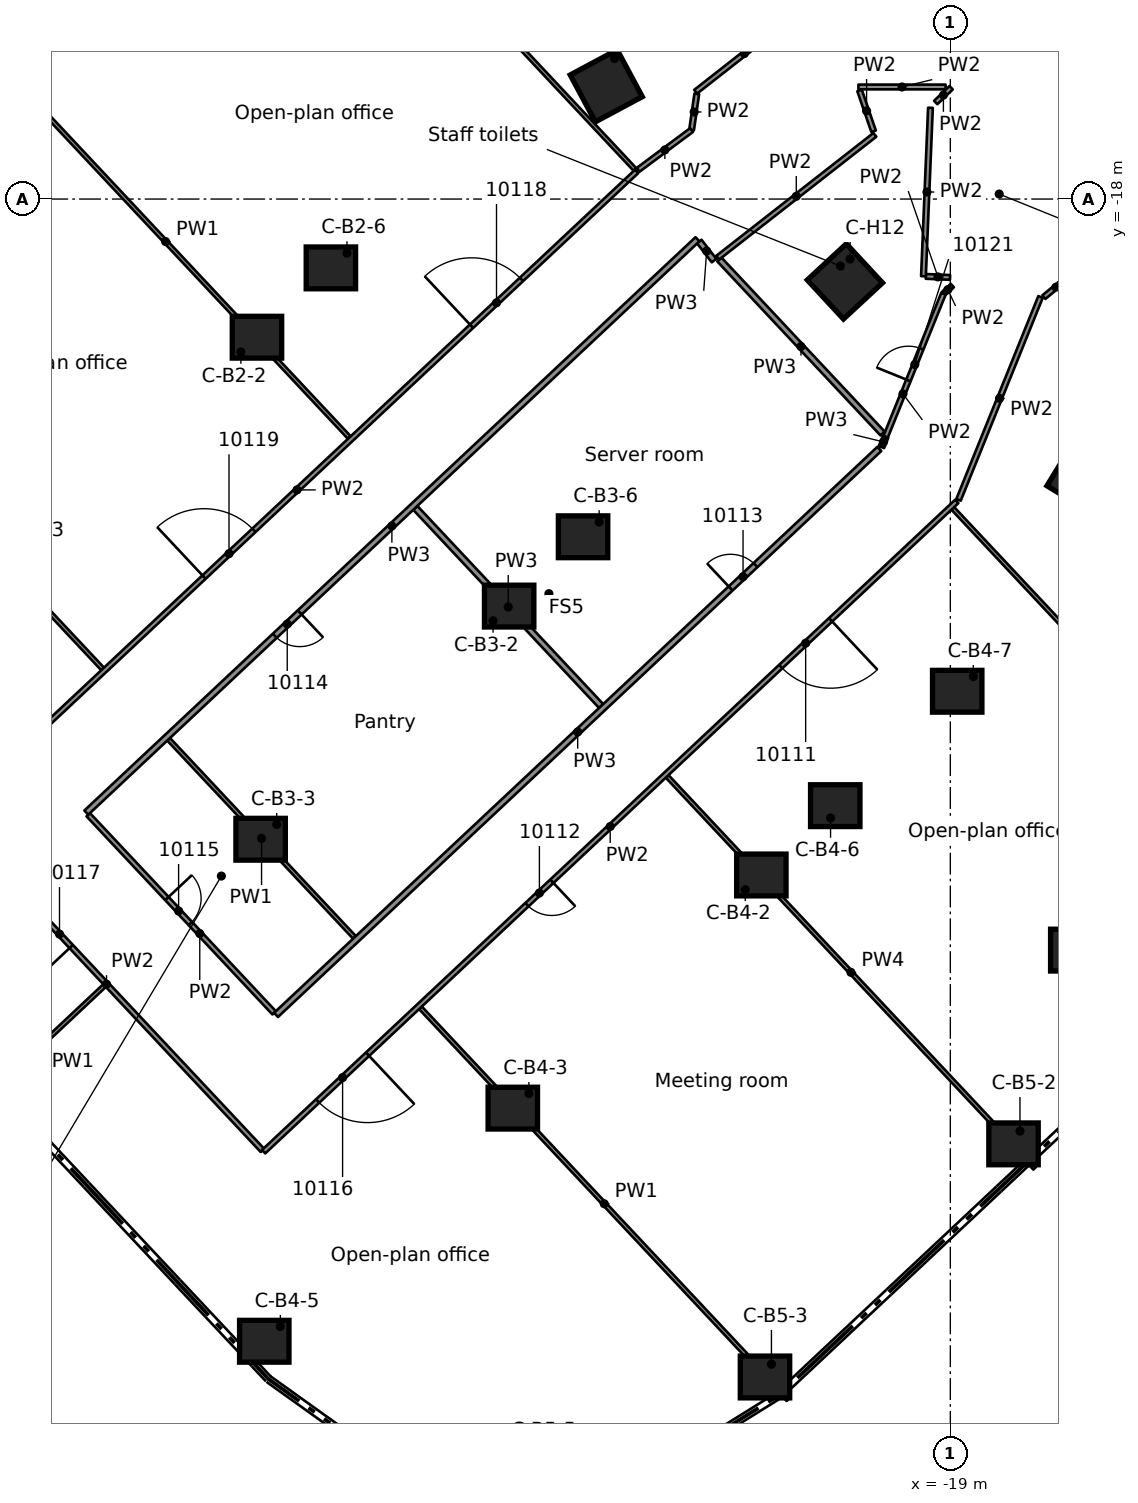
"""IFC4 building model, lengths in metres.
Left out: names, types, materials, properties, quantities, classifications, styles, units other than length and angle.
Written with IfcOpenShell. Run it as: python <this file> out.ifc"""

import sys

from ifc_helpers import new_model, si_unit, direction, frame, frame_2d, origin, origin_2d, place, context, subcontext, project, spatial, rectangle, extrude, element, fill, save


model = new_model("IFC4")
c1 = context("Model", 3, precision=1e-05, world=origin(), true_north=direction((0.0, 1.0)))
c2 = subcontext(c1, "Body", "Model", "MODEL_VIEW")
j1 = project(units=[si_unit("LENGTHUNIT", "METRE"), si_unit("PLANEANGLEUNIT", "RADIAN")], contexts=[c1])
p1 = place(None, origin())
s1 = spatial("IfcSite", under=j1, at=p1, CompositionType="ELEMENT")
p2 = place(p1, origin())
s2 = spatial("IfcBuilding", under=s1, at=p2, CompositionType="ELEMENT")
p3 = place(p2, frame((0.0, 0.0, 51.3)))
s3 = spatial("IfcBuildingStorey", under=s2, at=p3, CompositionType="ELEMENT", Elevation=51.3)
for number, where, z_axis, x_axis in (
    (1, (-37.245, -21.635, 0.0), (0.0, 0.0, 1.0), (1.0, 0.0, 0.0)),
    (2, (-35.3, -19.811, 0.0), (0.0, 0.0, 1.0), (1.0, 0.0, 0.0)),
    (3, (-30.609, -28.71, 0.0), (0.0, 0.0, 1.0), (1.0, 0.0, 0.0)),
    (4, (-37.149, -34.845, 0.0), (0.0, 0.0, 1.0), (1.0, 0.0, 0.0)),
    (5, (-28.664, -26.886, 0.0), (0.0, 0.0, 1.0), (1.0, 0.0, 0.0)),
    (6, (-23.973, -35.785, 0.0), (0.0, 0.0, 1.0), (1.0, 0.0, 0.0)),
    (7, (-30.513, -41.92, 0.0), (0.0, 0.0, 1.0), (1.0, 0.0, 0.0)),
    (8, (-37.053, -48.054, 0.0), (0.0, 0.0, 1.0), (1.0, 0.0, 0.0)),
    (9, (-22.028, -33.961, 0.0), (0.0, 0.0, 1.0), (1.0, 0.0, 0.0)),
    (10, (-18.819, -30.951, 0.0), (0.0, 0.0, 1.0), (1.0, 0.0, 0.0)),
    (11, (-17.337, -42.86, 0.0), (0.0, 0.0, 1.0), (1.0, 0.0, 0.0)),
    (12, (-23.877, -48.994, 0.0), (0.0, 0.0, 1.0), (1.0, 0.0, 0.0)),
    (13, (-15.712, -37.762, 0.0), (0.0, 0.0, 1.0), (1.0, 0.0, 0.0)),
):
    element("IfcColumn", number, at=place(p3, frame(where, z_axis=z_axis, x_axis=x_axis)), inside=s3, PredefinedType="COLUMN", context=c2, shape_type="SweptSolid", body=[
        extrude(rectangle(XDim=1.3, YDim=1.1, at=origin_2d()), origin(), (0.0, 0.0, 1.0), 3.5),
    ])
for number, where, z_axis, x_axis in (
    (14, (-15.495, -25.313, 0.0), (0.0, 0.0, 1.0), (-0.522, -0.853, 0.0)),
    (15, (-21.774, -20.167, 0.0), (0.0, 0.0, 1.0), (-0.734, -0.68, 0.0)),
    (16, (-28.054, -15.021, 0.0), (0.0, 0.0, 1.0), (-0.882, -0.472, 0.0)),
):
    element("IfcColumn", number, at=place(p3, frame(where, z_axis=z_axis, x_axis=x_axis)), inside=s3, PredefinedType="COLUMN", context=c2, shape_type="SweptSolid", body=[
        extrude(rectangle(XDim=1.4, YDim=1.4, at=origin_2d()), origin(), (0.0, 0.0, 1.0), 3.5),
    ])
p4 = place(p3, frame((-21.388, -15.143, 0.0), z_axis=(0.0, 0.0, 1.0), x_axis=(0.324857441557, -0.945762994976, 0.0)))
e17 = element("IfcWall", 17, at=p4, inside=s3, PredefinedType="PARTITIONING", context=c2, shape_type="SweptSolid", body=[
    extrude(rectangle(XDim=1.135, YDim=0.125, at=frame_2d((0.568, 0.0))), origin(), (0.0, 0.0, 1.0), 3.08),
])
p5 = place(p3, frame((-25.672, -15.233, 0.0), z_axis=(0.0, 0.0, 1.0), x_axis=(-0.142523859518, -0.989791366636, 0.0)))
e18 = element("IfcWall", 18, at=p5, inside=s3, PredefinedType="PARTITIONING", context=c2, shape_type="SweptSolid", body=[
    extrude(rectangle(XDim=0.961, YDim=0.125, at=frame_2d((0.48, 0.0))), origin(), (0.0, 0.0, 1.0), 3.08),
])
p6 = place(p3, frame((-25.607, -19.117, 0.0), z_axis=(0.0, 0.0, 1.0), x_axis=(0.613435225839, -0.789745037148, 0.0)))
e19 = element("IfcWall", 19, at=p6, inside=s3, PredefinedType="PARTITIONING", context=c2, shape_type="SweptSolid", body=[
    extrude(rectangle(XDim=0.635, YDim=0.15, at=frame_2d((0.318, 0.0))), origin(), (0.0, 0.0, 1.0), 3.08),
])
p7 = place(p3, frame((-37.101, -43.032, 0.0), z_axis=(0.0, 0.0, 1.0), x_axis=(-0.684230259848, 0.729266036168, 0.0)))
e20 = element("IfcWall", 20, at=p7, inside=s3, PredefinedType="PARTITIONING", context=c2, shape_type="SweptSolid", body=[
    extrude(rectangle(XDim=11.991, YDim=0.125, at=frame_2d((5.996, 0.0))), origin(), (0.0, 0.0, 1.0), 3.08),
])
p8 = place(p7, frame((7.355, 0.0, 0.0)))
e21 = element("IfcOpeningElement", 21, at=p8, cuts=e20, PredefinedType="OPENING", context=c2, shape_type="SweptSolid", body=[
    extrude(rectangle(XDim=0.9, YDim=2.1, at=frame_2d((0.45, 1.05))), frame((0.0, 0.073, 0.0), z_axis=(0.0, -1.0, 0.0), x_axis=(1.0, 0.0, 0.0)), (0.0, 0.0, 1.0), 0.145),
])
p9 = place(p3, frame((-41.685, -34.199, 0.0), z_axis=(0.0, 0.0, 1.0), x_axis=(0.68422395917, -0.729271947697, 0.0)))
e22 = element("IfcWall", 22, at=p9, inside=s3, PredefinedType="PARTITIONING", context=c2, shape_type="SweptSolid", body=[
    extrude(rectangle(XDim=7.148, YDim=0.125, at=frame_2d((3.574, 0.0))), origin(), (0.0, 0.0, 1.0), 3.08),
])
p10 = place(p9, frame((3.025, 0.0, 0.0)))
e23 = element("IfcOpeningElement", 23, at=p10, cuts=e22, PredefinedType="OPENING", context=c2, shape_type="SweptSolid", body=[
    extrude(rectangle(XDim=0.9, YDim=2.1, at=frame_2d((0.45, 1.05))), frame((0.0, 0.073, 0.0), z_axis=(0.0, -1.0, 0.0), x_axis=(1.0, 0.0, 0.0)), (0.0, 0.0, 1.0), 0.145),
])
p11 = place(p3, frame((-50.979, -20.052, 0.0), z_axis=(0.0, 0.0, 1.0), x_axis=(0.684149048077, -0.729342224209, 0.0)))
e24 = element("IfcWall", 24, at=p11, inside=s3, PredefinedType="PARTITIONING", context=c2, shape_type="SweptSolid", body=[
    extrude(rectangle(XDim=14.137, YDim=0.1, at=frame_2d((7.069, 0.0))), origin(), (0.0, 0.0, 1.0), 3.08),
])
p12 = place(p3, frame((-39.57, -32.215, 0.0), z_axis=(0.0, 0.0, 1.0), x_axis=(0.684241001323, -0.729255957884, 0.0)))
e25 = element("IfcWall", 25, at=p12, inside=s3, PredefinedType="PARTITIONING", context=c2, shape_type="SweptSolid", body=[
    extrude(rectangle(XDim=7.148, YDim=0.1, at=frame_2d((3.574, 0.0))), origin(), (0.0, 0.0, 1.0), 3.08),
])
p13 = place(p3, frame((-32.943, -39.281, 0.0), z_axis=(0.0, 0.0, 1.0), x_axis=(0.684149048077, -0.729342224209, 0.0)))
e26 = element("IfcWall", 26, at=p13, inside=s3, PredefinedType="PARTITIONING", context=c2, shape_type="SweptSolid", body=[
    extrude(rectangle(XDim=14.137, YDim=0.1, at=frame_2d((7.069, 0.0))), origin(), (0.0, 0.0, 1.0), 3.08),
])
p14 = place(p3, frame((-44.487, -13.963, 0.0), z_axis=(0.0, 0.0, 1.0), x_axis=(0.684112301014, -0.729376692526, 0.0)))
e27 = element("IfcWall", 27, at=p14, inside=s3, PredefinedType="PARTITIONING", context=c2, shape_type="SweptSolid", body=[
    extrude(rectangle(XDim=14.137, YDim=0.1, at=frame_2d((7.068, 0.0))), origin(), (0.0, 0.0, 1.0), 3.08),
])
p15 = place(p3, frame((-33.079, -26.126, 0.0), z_axis=(0.0, 0.0, 1.0), x_axis=(0.684155795313, -0.729335895003, 0.0)))
e28 = element("IfcWall", 28, at=p15, inside=s3, PredefinedType="PARTITIONING", context=c2, shape_type="SweptSolid", body=[
    extrude(rectangle(XDim=7.149, YDim=0.15, at=frame_2d((3.575, 0.0))), origin(), (0.0, 0.0, 1.0), 3.08),
])
p16 = place(p3, frame((-26.451, -33.192, 0.0), z_axis=(0.0, 0.0, 1.0), x_axis=(0.684103113435, -0.729385309825, 0.0)))
e29 = element("IfcWall", 29, at=p16, inside=s3, PredefinedType="PARTITIONING", context=c2, shape_type="SweptSolid", body=[
    extrude(rectangle(XDim=14.137, YDim=0.1, at=frame_2d((7.068, 0.0))), origin(), (0.0, 0.0, 1.0), 2.445),
])
p17 = place(p3, frame((-36.97, -6.912, 0.0), z_axis=(0.0, 0.0, 1.0), x_axis=(0.684148478852, -0.729342758163, 0.0)))
e30 = element("IfcWall", 30, at=p17, inside=s3, PredefinedType="PARTITIONING", context=c2, shape_type="SweptSolid", body=[
    extrude(rectangle(XDim=14.137, YDim=0.1, at=frame_2d((7.069, 0.0))), origin(), (0.0, 0.0, 1.0), 3.08),
])
p18 = place(p3, frame((-25.078, -19.59, 0.0), z_axis=(0.0, 0.0, 1.0), x_axis=(0.684131264462, -0.729358905468, 0.0)))
e31 = element("IfcWall", 31, at=p18, inside=s3, PredefinedType="PARTITIONING", context=c2, shape_type="SweptSolid", body=[
    extrude(rectangle(XDim=6.278, YDim=0.15, at=frame_2d((3.139, 0.0))), origin(), (0.0, 0.0, 1.0), 3.08),
])
p19 = place(p3, frame((-18.934, -26.141, 0.0), z_axis=(0.0, 0.0, 1.0), x_axis=(0.684157665042, -0.729334141094, 0.0)))
e32 = element("IfcWall", 32, at=p19, inside=s3, PredefinedType="PARTITIONING", context=c2, shape_type="SweptSolid", body=[
    extrude(rectangle(XDim=14.137, YDim=0.1, at=frame_2d((7.069, 0.0))), origin(), (0.0, 0.0, 1.0), 3.08),
])
p20 = place(p3, frame((-16.539, -20.581, 0.0), z_axis=(0.0, 0.0, 1.0), x_axis=(0.771202229891, 0.636590229748, 0.0)))
e33 = element("IfcWall", 33, at=p20, inside=s3, PredefinedType="PARTITIONING", context=c2, shape_type="SweptSolid", body=[
    extrude(rectangle(XDim=0.823, YDim=0.125, at=frame_2d((0.412, 0.0))), origin(), (0.0, 0.0, 1.0), 3.08),
])
p21 = place(p3, frame((-19.644, -20.035, 0.0), z_axis=(0.0, 0.0, 1.0), x_axis=(0.999093412753, -0.04257173467, 0.0)))
e34 = element("IfcWall", 34, at=p21, inside=s3, PredefinedType="PARTITIONING", context=c2, shape_type="SweptSolid", body=[
    extrude(rectangle(XDim=0.636, YDim=0.125, at=frame_2d((0.318, 0.0))), origin(), (0.0, 0.0, 1.0), 3.08),
])
p22 = place(p3, frame((-21.418, -15.051, 0.0), z_axis=(0.0, 0.0, 1.0), x_axis=(1.0, 0.0, 0.0)))
e35 = element("IfcWall", 35, at=p22, inside=s3, PredefinedType="PARTITIONING", context=c2, shape_type="SweptSolid", body=[
    extrude(rectangle(XDim=2.293, YDim=0.125, at=frame_2d((1.146, 0.0))), origin(), (0.0, 0.0, 1.0), 3.08),
])
p23 = place(p3, frame((-25.809, -16.184, 0.0), z_axis=(0.0, 0.0, 1.0), x_axis=(-0.802084274436, -0.597210864522, 0.0)))
e36 = element("IfcWall", 36, at=p23, inside=s3, PredefinedType="PARTITIONING", context=c2, shape_type="SweptSolid", body=[
    extrude(rectangle(XDim=1.753, YDim=0.125, at=frame_2d((0.876, 0.0))), origin(), (0.0, 0.0, 1.0), 3.08),
])
p24 = place(p3, frame((-20.986, -16.311, 0.0), z_axis=(0.0, 0.0, 1.0), x_axis=(-0.787889650509, -0.615816448807, 0.0)))
e37 = element("IfcWall", 37, at=p24, inside=s3, PredefinedType="PARTITIONING", context=c2, shape_type="SweptSolid", body=[
    extrude(rectangle(XDim=5.248, YDim=0.125, at=frame_2d((2.624, 0.0))), origin(), (0.0, 0.0, 1.0), 3.08),
])
p25 = place(p3, frame((-23.136, -13.166, 0.0), z_axis=(0.0, 0.0, 1.0), x_axis=(-0.787076551365, -0.616855333358, 0.0)))
e38 = element("IfcWall", 38, at=p25, inside=s3, PredefinedType="PARTITIONING", context=c2, shape_type="SweptSolid", body=[
    extrude(rectangle(XDim=3.26, YDim=0.125, at=frame_2d((1.63, 0.0))), origin(), (0.0, 0.0, 1.0), 3.08),
])
p26 = place(p3, frame((-19.181, -20.491, 0.0), z_axis=(0.0, 0.0, 1.0), x_axis=(0.734655808159, 0.678440007325, 0.0)))
e39 = element("IfcWall", 39, at=p26, inside=s3, PredefinedType="PARTITIONING", context=c2, shape_type="SweptSolid", body=[
    extrude(rectangle(XDim=0.317, YDim=0.125, at=frame_2d((0.159, 0.0))), origin(), (0.0, 0.0, 1.0), 3.08),
])
p27 = place(p3, frame((-18.83, -25.956, 0.0), z_axis=(0.0, 0.0, 1.0), x_axis=(-0.729340205708, -0.684151199909, 0.0)))
e40 = element("IfcWall", 40, at=p27, inside=s3, PredefinedType="PARTITIONING", context=c2, shape_type="SweptSolid", body=[
    extrude(rectangle(XDim=25.009, YDim=0.125, at=frame_2d((12.504, 0.0))), origin(), (0.0, 0.0, 1.0), 3.08),
])
p28 = place(p27, frame((4.553, 0.0, 0.0)))
e41 = element("IfcOpeningElement", 41, at=p28, cuts=e40, PredefinedType="OPENING", context=c2, shape_type="SweptSolid", body=[
    extrude(rectangle(XDim=1.8, YDim=2.1, at=frame_2d((0.9, 1.05))), frame((0.0, 0.073, 0.0), z_axis=(0.0, -1.0, 0.0), x_axis=(1.0, 0.0, 0.0)), (0.0, 0.0, 1.0), 0.145),
])
p29 = place(p27, frame((14.609, 0.0, 0.0)))
e42 = element("IfcOpeningElement", 42, at=p29, cuts=e40, PredefinedType="OPENING", context=c2, shape_type="SweptSolid", body=[
    extrude(rectangle(XDim=0.9, YDim=2.1, at=frame_2d((0.45, 1.05))), frame((0.0, 0.073, 0.0), z_axis=(0.0, -1.0, 0.0), x_axis=(1.0, 0.0, 0.0)), (0.0, 0.0, 1.0), 0.145),
])
p30 = place(p27, frame((21.26, 0.0, 0.0)))
e43 = element("IfcOpeningElement", 43, at=p30, cuts=e40, PredefinedType="OPENING", context=c2, shape_type="SweptSolid", body=[
    extrude(rectangle(XDim=1.8, YDim=2.1, at=frame_2d((0.9, 1.05))), frame((0.0, 0.073, 0.0), z_axis=(0.0, -1.0, 0.0), x_axis=(1.0, 0.0, 0.0)), (0.0, 0.0, 1.0), 0.145),
])
p31 = place(p3, frame((-36.743, -39.467, 0.0), z_axis=(0.0, 0.0, 1.0), x_axis=(0.729324503449, 0.684167938936, 0.0)))
e44 = element("IfcWall", 44, at=p31, inside=s3, PredefinedType="PARTITIONING", context=c2, shape_type="SweptSolid", body=[
    extrude(rectangle(XDim=21.767, YDim=0.15, at=frame_2d((10.883, 0.0))), origin(), (0.0, 0.0, 1.0), 3.08),
])
p32 = place(p31, frame((16.399, 0.0, 0.0)))
e45 = element("IfcOpeningElement", 45, at=p32, cuts=e44, PredefinedType="OPENING", context=c2, shape_type="SweptSolid", body=[
    extrude(rectangle(XDim=0.9, YDim=2.1, at=frame_2d((0.45, 1.05))), frame((0.0, 0.085, 0.0), z_axis=(0.0, -1.0, 0.0), x_axis=(1.0, 0.0, 0.0)), (0.0, 0.0, 1.0), 0.17),
])
p33 = place(p3, frame((-44.309, -41.561, 0.0), z_axis=(0.0, 0.0, 1.0), x_axis=(0.729200696285, 0.684299893715, 0.0)))
e46 = element("IfcWall", 46, at=p33, inside=s3, PredefinedType="PARTITIONING", context=c2, shape_type="SweptSolid", body=[
    extrude(rectangle(XDim=4.187, YDim=0.1, at=frame_2d((2.093, 0.0))), origin(), (0.0, 0.0, 1.0), 3.08),
])
p34 = place(p3, frame((-25.654, -19.058, 0.0), z_axis=(0.0, 0.0, 1.0), x_axis=(-0.729332765971, -0.684159130964, 0.0)))
e47 = element("IfcWall", 47, at=p34, inside=s3, PredefinedType="PARTITIONING", context=c2, shape_type="SweptSolid", body=[
    extrude(rectangle(XDim=22.05, YDim=0.15, at=frame_2d((11.025, 0.0))), origin(), (0.0, 0.0, 1.0), 3.08),
])
p35 = place(p34, frame((14.351, 0.0, 0.0)))
e48 = element("IfcOpeningElement", 48, at=p35, cuts=e47, PredefinedType="OPENING", context=c2, shape_type="SweptSolid", body=[
    extrude(rectangle(XDim=0.9, YDim=2.1, at=frame_2d((0.45, 1.05))), frame((0.0, 0.085, 0.0), z_axis=(0.0, -1.0, 0.0), x_axis=(1.0, 0.0, 0.0)), (0.0, 0.0, 1.0), 0.17),
])
p36 = place(p3, frame((-45.13, -34.035, 0.0), z_axis=(0.0, 0.0, 1.0), x_axis=(0.729450212829, 0.684033907788, 0.0)))
e49 = element("IfcWall", 49, at=p36, inside=s3, PredefinedType="PARTITIONING", context=c2, shape_type="SweptSolid", body=[
    extrude(rectangle(XDim=24.507, YDim=0.125, at=frame_2d((12.254, 0.0))), origin(), (0.0, 0.0, 1.0), 3.08),
])
p37 = place(p36, frame((18.55, 0.0, 0.0)))
e50 = element("IfcOpeningElement", 50, at=p37, cuts=e49, PredefinedType="OPENING", context=c2, shape_type="SweptSolid", body=[
    extrude(rectangle(XDim=1.8, YDim=2.1, at=frame_2d((0.9, 1.05))), frame((0.0, 0.073, 0.0), z_axis=(0.0, -1.0, 0.0), x_axis=(1.0, 0.0, 0.0)), (0.0, 0.0, 1.0), 0.145),
])
p38 = place(p36, frame((8.9, 0.0, 0.0)))
e51 = element("IfcOpeningElement", 51, at=p38, cuts=e49, PredefinedType="OPENING", context=c2, shape_type="SweptSolid", body=[
    extrude(rectangle(XDim=1.8, YDim=2.1, at=frame_2d((0.9, 1.05))), frame((0.0, 0.073, 0.0), z_axis=(0.0, -1.0, 0.0), x_axis=(1.0, 0.0, 0.0)), (0.0, 0.0, 1.0), 0.145),
])
p39 = place(p3, frame((-19.385, -15.46, 0.0), z_axis=(0.0, 0.0, 1.0), x_axis=(0.72214184162, 0.691745011245, 0.0)))
e52 = element("IfcWall", 52, at=p39, inside=s3, PredefinedType="PARTITIONING", context=c2, shape_type="SweptSolid", body=[
    extrude(rectangle(XDim=0.562, YDim=0.125, at=frame_2d((0.281, 0.0))), origin(), (0.0, 0.0, 1.0), 3.08),
])
p40 = place(p3, frame((-18.784, -25.914, 0.0), z_axis=(0.0, 0.0, 1.0), x_axis=(0.374700754386, 0.927145805504, 0.0)))
e53 = element("IfcWall", 53, at=p40, inside=s3, PredefinedType="PARTITIONING", context=c2, shape_type="SweptSolid", body=[
    extrude(rectangle(XDim=5.757, YDim=0.125, at=frame_2d((2.878, 0.0))), origin(), (0.0, 0.0, 1.0), 3.08),
])
p41 = place(p3, frame((-20.703, -24.255, 0.0), z_axis=(0.0, 0.0, 1.0), x_axis=(0.374955263634, 0.927042906382, 0.0)))
e54 = element("IfcWall", 54, at=p41, inside=s3, PredefinedType="PARTITIONING", context=c2, shape_type="SweptSolid", body=[
    extrude(rectangle(XDim=4.059, YDim=0.125, at=frame_2d((2.03, 0.0))), origin(), (0.0, 0.0, 1.0), 3.08),
])
p42 = place(p41, frame((1.6, 0.0, 0.0)))
e55 = element("IfcOpeningElement", 55, at=p42, cuts=e54, PredefinedType="OPENING", context=c2, shape_type="SweptSolid", body=[
    extrude(rectangle(XDim=0.9, YDim=2.1, at=frame_2d((0.45, 1.05))), frame((0.0, 0.073, 0.0), z_axis=(0.0, -1.0, 0.0), x_axis=(1.0, 0.0, 0.0)), (0.0, 0.0, 1.0), 0.145),
])
p43 = place(p3, frame((-20.812, -24.525, 0.0), z_axis=(0.0, 0.0, 1.0), x_axis=(0.374712521876, 0.927141049652, 0.0)))
e56 = element("IfcWall", 56, at=p43, inside=s3, PredefinedType="PARTITIONING", context=c2, shape_type="SweptSolid", body=[
    extrude(rectangle(XDim=0.291, YDim=0.15, at=frame_2d((0.146, 0.0))), origin(), (0.0, 0.0, 1.0), 3.08),
])
p44 = place(p3, frame((-19.707, -20.031, 0.0), z_axis=(0.0, 0.0, 1.0), x_axis=(0.04150005125, 0.999138501784, 0.0)))
e57 = element("IfcWall", 57, at=p44, inside=s3, PredefinedType="PARTITIONING", context=c2, shape_type="SweptSolid", body=[
    extrude(rectangle(XDim=4.436, YDim=0.125, at=frame_2d((2.218, 0.0))), origin(), (0.0, 0.0, 1.0), 3.08),
])
p45 = place(p28, origin())
e58 = element("IfcDoor", 58, at=p45, inside=s3, OperationType="DOUBLE_DOOR_SINGLE_SWING", PredefinedType="DOOR", context=c2, shape_type="SweptSolid", body=[
    extrude(rectangle(XDim=1.8, YDim=2.1, at=frame_2d((0.9, 1.05))), frame((0.0, 0.025, 0.0), z_axis=(0.0, -1.0, 0.0), x_axis=(1.0, 0.0, 0.0)), (0.0, 0.0, 1.0), 0.05),
])
fill(e41, e58)
p46 = place(p29, origin())
e59 = element("IfcDoor", 59, at=p46, inside=s3, OperationType="SINGLE_SWING_RIGHT", PredefinedType="DOOR", context=c2, shape_type="SweptSolid", body=[
    extrude(rectangle(XDim=0.9, YDim=2.1, at=frame_2d((0.45, 1.05))), frame((0.0, 0.025, 0.0), z_axis=(0.0, -1.0, 0.0), x_axis=(1.0, 0.0, 0.0)), (0.0, 0.0, 1.0), 0.05),
])
fill(e42, e59)
p47 = place(p32, origin())
e60 = element("IfcDoor", 60, at=p47, inside=s3, OperationType="SINGLE_SWING_RIGHT", PredefinedType="DOOR", context=c2, shape_type="SweptSolid", body=[
    extrude(rectangle(XDim=0.9, YDim=2.1, at=frame_2d((0.45, 1.05))), frame((0.0, 0.025, 0.0), z_axis=(0.0, -1.0, 0.0), x_axis=(1.0, 0.0, 0.0)), (0.0, 0.0, 1.0), 0.05),
])
fill(e45, e60)
p48 = place(p35, origin())
e61 = element("IfcDoor", 61, at=p48, inside=s3, OperationType="SINGLE_SWING_RIGHT", PredefinedType="DOOR", context=c2, shape_type="SweptSolid", body=[
    extrude(rectangle(XDim=0.9, YDim=2.1, at=frame_2d((0.45, 1.05))), frame((0.0, 0.025, 0.0), z_axis=(0.0, -1.0, 0.0), x_axis=(1.0, 0.0, 0.0)), (0.0, 0.0, 1.0), 0.05),
])
fill(e48, e61)
p49 = place(p10, origin())
e62 = element("IfcDoor", 62, at=p49, inside=s3, OperationType="SINGLE_SWING_LEFT", PredefinedType="DOOR", context=c2, shape_type="SweptSolid", body=[
    extrude(rectangle(XDim=0.9, YDim=2.1, at=frame_2d((0.45, 1.05))), frame((0.0, 0.025, 0.0), z_axis=(0.0, -1.0, 0.0), x_axis=(1.0, 0.0, 0.0)), (0.0, 0.0, 1.0), 0.05),
])
fill(e23, e62)
p50 = place(p30, origin())
e63 = element("IfcDoor", 63, at=p50, inside=s3, OperationType="DOUBLE_DOOR_SINGLE_SWING", PredefinedType="DOOR", context=c2, shape_type="SweptSolid", body=[
    extrude(rectangle(XDim=1.8, YDim=2.1, at=frame_2d((0.9, 1.05))), frame((0.0, 0.025, 0.0), z_axis=(0.0, -1.0, 0.0), x_axis=(1.0, 0.0, 0.0)), (0.0, 0.0, 1.0), 0.05),
])
fill(e43, e63)
p51 = place(p8, origin())
e64 = element("IfcDoor", 64, at=p51, inside=s3, OperationType="SINGLE_SWING_RIGHT", PredefinedType="DOOR", context=c2, shape_type="SweptSolid", body=[
    extrude(rectangle(XDim=0.9, YDim=2.1, at=frame_2d((0.45, 1.05))), frame((0.0, 0.025, 0.0), z_axis=(0.0, -1.0, 0.0), x_axis=(1.0, 0.0, 0.0)), (0.0, 0.0, 1.0), 0.05),
])
fill(e21, e64)
p52 = place(p37, origin())
e65 = element("IfcDoor", 65, at=p52, inside=s3, OperationType="DOUBLE_DOOR_SINGLE_SWING", PredefinedType="DOOR", context=c2, shape_type="SweptSolid", body=[
    extrude(rectangle(XDim=1.8, YDim=2.1, at=frame_2d((0.9, 1.05))), frame((0.0, 0.025, 0.0), z_axis=(0.0, -1.0, 0.0), x_axis=(1.0, 0.0, 0.0)), (0.0, 0.0, 1.0), 0.05),
])
fill(e50, e65)
p53 = place(p38, origin())
e66 = element("IfcDoor", 66, at=p53, inside=s3, OperationType="DOUBLE_DOOR_SINGLE_SWING", PredefinedType="DOOR", context=c2, shape_type="SweptSolid", body=[
    extrude(rectangle(XDim=1.8, YDim=2.1, at=frame_2d((0.9, 1.05))), frame((0.0, 0.025, 0.0), z_axis=(0.0, -1.0, 0.0), x_axis=(1.0, 0.0, 0.0)), (0.0, 0.0, 1.0), 0.05),
])
fill(e51, e66)
p54 = place(p42, origin())
e67 = element("IfcDoor", 67, at=p54, inside=s3, OperationType="SINGLE_SWING_RIGHT", PredefinedType="DOOR", context=c2, shape_type="SweptSolid", body=[
    extrude(rectangle(XDim=0.9, YDim=2.1, at=frame_2d((0.45, 1.05))), frame((0.0, 0.025, 0.0), z_axis=(0.0, -1.0, 0.0), x_axis=(1.0, 0.0, 0.0)), (0.0, 0.0, 1.0), 0.05),
])
fill(e55, e67)
save(model, sys.argv[1])
